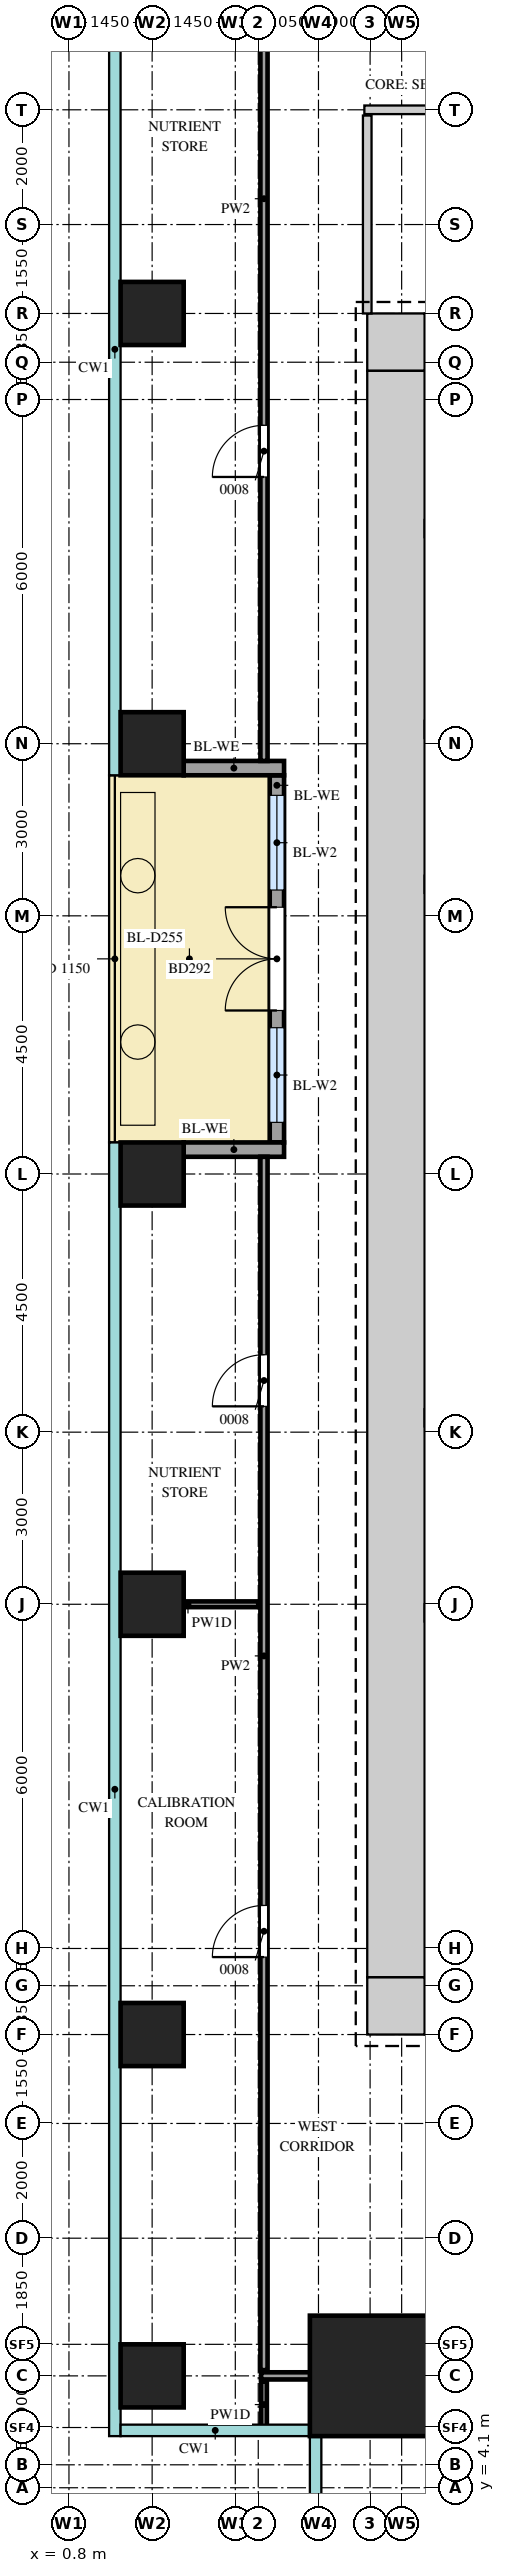
"""IFC4 building model, lengths in metres.
Left out: names, types, materials, properties, quantities, classifications, styles, units other than length and angle.
Written with IfcOpenShell. Run it as: python <this file> out.ifc"""

import sys

from ifc_helpers import new_model, si_unit, direction, frame, frame_2d, origin, origin_2d, place, context, subcontext, project, spatial, rectangle, extrude, source, transform, mapped, element, fill, save


model = new_model("IFC4")
c1 = context("Model", 3, precision=1e-05, world=origin(), true_north=direction((0.0, 1.0)))
c2 = subcontext(c1, "Body", "Model", "MODEL_VIEW")
j1 = project(units=[si_unit("LENGTHUNIT", "METRE"), si_unit("PLANEANGLEUNIT", "RADIAN")], contexts=[c1])
p1 = place(None, origin())
s1 = spatial("IfcSite", under=j1, at=p1, CompositionType="ELEMENT")
p2 = place(p1, origin())
s2 = spatial("IfcBuilding", under=s1, at=p2, CompositionType="ELEMENT")
p3 = place(p2, frame((0.0, 0.0, 136.7)))
s3 = spatial("IfcBuildingStorey", under=s2, at=p3, CompositionType="ELEMENT", Elevation=136.7)
m1 = source(origin(), c2, "Body", "SweptSolid", [
    extrude(rectangle(XDim=1.0, YDim=1.0, at=frame_2d((0.5, 0.0))), origin(), (0.0, 0.0, 1.0), 4.1),
])
for number, where, z_axis, x_axis in (
    (1, (6.0, 41.5, 0.0), (0.0, 0.0, 1.0), (1.0, 0.0, 0.0)),
    (2, (6.0, 12.5, 0.0), (0.0, 0.0, 1.0), (1.0, 0.0, 0.0)),
):
    element("IfcWall", number, at=place(p3, frame(where, z_axis=z_axis, x_axis=x_axis)), inside=s3, PredefinedType="SHEAR", context=c2, shape_type="MappedRepresentation", body=[
        mapped(m1, transform((0.0, 0.0, 0.0))),
    ])
m2 = source(origin(), c2, "Body", "SweptSolid", [
    extrude(rectangle(XDim=28.0, YDim=1.0, at=frame_2d((14.0, 0.0))), origin(), (0.0, 0.0, 1.0), 4.1),
])
p4 = place(p3, frame((6.5, 13.0, 0.0), z_axis=(0.0, 0.0, 1.0), x_axis=(0.0, 1.0, 0.0)))
e3 = element("IfcWall", 3, at=p4, inside=s3, PredefinedType="SHEAR", context=c2, shape_type="MappedRepresentation", body=[
    mapped(m2, transform((0.0, 0.0, 0.0))),
])
m3 = source(origin(), c2, "Body", "SweptSolid", [
    extrude(rectangle(XDim=2.1, YDim=2.1, at=origin_2d()), origin(), (0.0, 0.0, 1.0), 4.4),
])
p5 = place(p3, frame((6.05, 6.05, 0.0), z_axis=(0.0, 0.0, 1.0), x_axis=(1.0, 0.0, 0.0)))
e4 = element("IfcColumn", 4, at=p5, inside=s3, PredefinedType="COLUMN", context=c2, shape_type="MappedRepresentation", body=[
    mapped(m3, transform((0.0, 0.0, 0.0))),
])
m4 = source(origin(), c2, "Body", "SweptSolid", [
    extrude(rectangle(XDim=1.1, YDim=1.1, at=origin_2d()), origin(), (0.0, 0.0, 1.0), 4.1),
])
for number, where, z_axis, x_axis in (
    (5, (2.25, 6.05, 0.0), (0.0, 0.0, 1.0), (1.0, 0.0, 0.0)),
    (6, (2.25, 12.0, 0.0), (0.0, 0.0, 1.0), (1.0, 0.0, 0.0)),
    (7, (2.25, 19.5, 0.0), (0.0, 0.0, 1.0), (1.0, 0.0, 0.0)),
    (8, (2.25, 27.0, 0.0), (0.0, 0.0, 1.0), (1.0, 0.0, 0.0)),
    (9, (2.25, 34.5, 0.0), (0.0, 0.0, 1.0), (1.0, 0.0, 0.0)),
    (10, (2.25, 42.0, 0.0), (0.0, 0.0, 1.0), (1.0, 0.0, 0.0)),
):
    element("IfcColumn", number, at=place(p3, frame(where, z_axis=z_axis, x_axis=x_axis)), inside=s3, PredefinedType="COLUMN", context=c2, shape_type="MappedRepresentation", body=[
        mapped(m4, transform((0.0, 0.0, 0.0))),
    ])
m5 = source(origin(), c2, "Body", "SweptSolid", [
    extrude(rectangle(XDim=6.4, YDim=0.25, at=frame_2d((3.2, 0.0))), origin(), (0.0, 0.0, 1.0), 3.5),
])
p6 = place(p3, frame((4.425, 27.55, 0.0), z_axis=(0.0, 0.0, 1.0), x_axis=(0.0, 1.0, 0.0)))
e11 = element("IfcWall", 11, at=p6, inside=s3, PredefinedType="SOLIDWALL", context=c2, shape_type="MappedRepresentation", body=[
    mapped(m5, transform((0.0, 0.0, 0.0))),
])
m6 = source(origin(), c2, "Body", "SweptSolid", [
    extrude(rectangle(XDim=1.65, YDim=2.4, at=frame_2d((0.825, 1.2))), frame((0.0, 0.135, 0.0), z_axis=(0.0, -1.0, 0.0), x_axis=(1.0, 0.0, 0.0)), (0.0, 0.0, 1.0), 0.27),
])
p7 = place(p6, frame((0.35, 0.0, 0.0)))
e12 = element("IfcOpeningElement", 12, at=p7, cuts=e11, PredefinedType="OPENING", context=c2, shape_type="MappedRepresentation", body=[
    mapped(m6, transform((0.0, 0.0, 0.0))),
])
p8 = place(p6, frame((4.4, 0.0, 0.0)))
e13 = element("IfcOpeningElement", 13, at=p8, cuts=e11, PredefinedType="OPENING", context=c2, shape_type="MappedRepresentation", body=[
    mapped(m6, transform((0.0, 0.0, 0.0))),
])
m7 = source(origin(), c2, "Body", "SweptSolid", [
    extrude(rectangle(XDim=1.8, YDim=2.4, at=frame_2d((0.9, 1.2))), frame((0.0, 0.135, 0.0), z_axis=(0.0, -1.0, 0.0), x_axis=(1.0, 0.0, 0.0)), (0.0, 0.0, 1.0), 0.27),
])
p9 = place(p6, frame((2.3, 0.0, 0.0)))
e14 = element("IfcOpeningElement", 14, at=p9, cuts=e11, PredefinedType="OPENING", context=c2, shape_type="MappedRepresentation", body=[
    mapped(m7, transform((0.0, 0.0, 0.0))),
])
m8 = source(origin(), c2, "Body", "SweptSolid", [
    extrude(rectangle(XDim=1.75, YDim=0.25, at=frame_2d((0.875, 0.0))), origin(), (0.0, 0.0, 1.0), 3.5),
])
for number, where, z_axis, x_axis in (
    (15, (2.8, 27.425, 0.0), (0.0, 0.0, 1.0), (1.0, 0.0, 0.0)),
    (16, (2.8, 34.075, 0.0), (0.0, 0.0, 1.0), (1.0, 0.0, 0.0)),
):
    element("IfcWall", number, at=place(p3, frame(where, z_axis=z_axis, x_axis=x_axis)), inside=s3, PredefinedType="SOLIDWALL", context=c2, shape_type="MappedRepresentation", body=[
        mapped(m8, transform((0.0, 0.0, 0.0))),
    ])
m9 = source(origin(), c2, "Body", "SweptSolid", [
    extrude(rectangle(XDim=0.8, YDim=0.1, at=frame_2d((0.4, 0.0))), origin(), (0.0, 0.0, 1.0), 4.2),
])
p10 = place(p3, frame((4.2, 5.15, 0.0), z_axis=(0.0, 0.0, 1.0), x_axis=(0.0, 1.0, 0.0)))
e17 = element("IfcWall", 17, at=p10, inside=s3, PredefinedType="PARTITIONING", context=c2, shape_type="MappedRepresentation", body=[
    mapped(m9, transform((0.0, 0.0, 0.0))),
])
m10 = source(origin(), c2, "Body", "SweptSolid", [
    extrude(rectangle(XDim=22.3, YDim=0.125, at=frame_2d((11.15, 0.0))), origin(), (0.0, 0.0, 1.0), 3.55),
])
p11 = place(p3, frame((4.15, 6.05, 0.0), z_axis=(0.0, 0.0, 1.0), x_axis=(1.0, 0.0, 0.0)))
e18 = element("IfcWall", 18, at=p11, inside=s3, PredefinedType="PARTITIONING", context=c2, shape_type="MappedRepresentation", body=[
    mapped(m10, transform((0.0, 0.0, 0.0))),
])
m11 = source(origin(), c2, "Body", "SweptSolid", [
    extrude(rectangle(XDim=0.9, YDim=2.1, at=frame_2d((0.45, 1.05))), frame((0.0, 0.073, 0.0), z_axis=(0.0, -1.0, 0.0), x_axis=(1.0, 0.0, 0.0)), (0.0, 0.0, 1.0), 0.145),
])
p12 = place(p11, frame((10.7, 0.0, 0.0)))
e19 = element("IfcOpeningElement", 19, at=p12, cuts=e18, PredefinedType="OPENING", context=c2, shape_type="MappedRepresentation", body=[
    mapped(m11, transform((0.0, 0.0, 0.0))),
])
m12 = source(origin(), c2, "Body", "SweptSolid", [
    extrude(rectangle(XDim=21.15, YDim=0.125, at=frame_2d((10.575, 0.0))), origin(), (0.0, 0.0, 1.0), 4.2),
])
p13 = place(p3, frame((4.2, 6.15, 0.0), z_axis=(0.0, 0.0, 1.0), x_axis=(0.0, 1.0, 0.0)))
e20 = element("IfcWall", 20, at=p13, inside=s3, PredefinedType="PARTITIONING", context=c2, shape_type="MappedRepresentation", body=[
    mapped(m12, transform((0.0, 0.0, 0.0))),
])
p14 = place(p13, frame((7.2, 0.0, 0.0)))
e21 = element("IfcOpeningElement", 21, at=p14, cuts=e20, PredefinedType="OPENING", context=c2, shape_type="MappedRepresentation", body=[
    mapped(m11, transform((0.0, 0.0, 0.0))),
])
p15 = place(p13, frame((16.8, 0.0, 0.0)))
e22 = element("IfcOpeningElement", 22, at=p15, cuts=e20, PredefinedType="OPENING", context=c2, shape_type="MappedRepresentation", body=[
    mapped(m11, transform((0.0, 0.0, 0.0))),
])
m13 = source(origin(), c2, "Body", "SweptSolid", [
    extrude(rectangle(XDim=2.45, YDim=0.1, at=frame_2d((1.225, 0.0))), origin(), (0.0, 0.0, 1.0), 4.2),
])
p16 = place(p3, frame((1.65, 19.5, 0.0), z_axis=(0.0, 0.0, 1.0), x_axis=(1.0, 0.0, 0.0)))
e23 = element("IfcWall", 23, at=p16, inside=s3, PredefinedType="PARTITIONING", context=c2, shape_type="MappedRepresentation", body=[
    mapped(m13, transform((0.0, 0.0, 0.0))),
])
m14 = source(origin(), c2, "Body", "SweptSolid", [
    extrude(rectangle(XDim=13.75, YDim=0.125, at=frame_2d((6.875, 0.0))), origin(), (0.0, 0.0, 1.0), 4.2),
])
p17 = place(p3, frame((4.2, 34.2, 0.0), z_axis=(0.0, 0.0, 1.0), x_axis=(0.0, 1.0, 0.0)))
e24 = element("IfcWall", 24, at=p17, inside=s3, PredefinedType="PARTITIONING", context=c2, shape_type="MappedRepresentation", body=[
    mapped(m14, transform((0.0, 0.0, 0.0))),
])
p18 = place(p17, frame((4.95, 0.0, 0.0)))
e25 = element("IfcOpeningElement", 25, at=p18, cuts=e24, PredefinedType="OPENING", context=c2, shape_type="MappedRepresentation", body=[
    mapped(m11, transform((0.0, 0.0, 0.0))),
])
m15 = source(origin(), c2, "Body", "SweptSolid", [
    extrude(rectangle(XDim=3.45, YDim=0.15, at=frame_2d((1.725, 0.0))), origin(), (0.0, 0.0, 1.0), 4.2),
])
p19 = place(p3, frame((6.0, 42.0, 0.0), z_axis=(0.0, 0.0, 1.0), x_axis=(0.0, 1.0, 0.0)))
e26 = element("IfcWall", 26, at=p19, inside=s3, PredefinedType="PARTITIONING", context=c2, shape_type="MappedRepresentation", body=[
    mapped(m15, transform((0.0, 0.0, 0.0))),
])
m16 = source(origin(), c2, "Body", "SweptSolid", [
    extrude(rectangle(XDim=7.95, YDim=0.15, at=frame_2d((3.975, 0.0))), origin(), (0.0, 0.0, 1.0), 4.2),
])
p20 = place(p3, frame((5.95, 45.55, 0.0), z_axis=(0.0, 0.0, 1.0), x_axis=(1.0, 0.0, 0.0)))
e27 = element("IfcWall", 27, at=p20, inside=s3, PredefinedType="PARTITIONING", context=c2, shape_type="MappedRepresentation", body=[
    mapped(m16, transform((0.0, 0.0, 0.0))),
])
m17 = source(origin(), c2, "Body", "SweptSolid", [
    extrude(rectangle(XDim=0.9, YDim=2.1, at=frame_2d((0.45, 1.05))), frame((0.0, 0.085, 0.0), z_axis=(0.0, -1.0, 0.0), x_axis=(1.0, 0.0, 0.0)), (0.0, 0.0, 1.0), 0.17),
])
p21 = place(p20, frame((3.55, 0.0, 0.0)))
e28 = element("IfcOpeningElement", 28, at=p21, cuts=e27, PredefinedType="OPENING", context=c2, shape_type="MappedRepresentation", body=[
    mapped(m17, transform((0.0, 0.0, 0.0))),
])
m18 = source(origin(), c2, "Body", "SweptSolid", [
    extrude(rectangle(XDim=1.65, YDim=2.4, at=frame_2d((0.825, 1.2))), frame((0.0, 0.03, 0.0), z_axis=(0.0, -1.0, 0.0), x_axis=(1.0, 0.0, 0.0)), (0.0, 0.0, 1.0), 0.06),
])
p22 = place(p7, origin())
e29 = element("IfcWindow", 29, at=p22, inside=s3, PartitioningType="SINGLE_PANEL", PredefinedType="WINDOW", context=c2, shape_type="MappedRepresentation", body=[
    mapped(m18, transform((0.0, 0.0, 0.0))),
])
fill(e12, e29)
p23 = place(p8, origin())
e30 = element("IfcWindow", 30, at=p23, inside=s3, PartitioningType="SINGLE_PANEL", PredefinedType="WINDOW", context=c2, shape_type="MappedRepresentation", body=[
    mapped(m18, transform((0.0, 0.0, 0.0))),
])
fill(e13, e30)
m19 = source(origin(), c2, "Body", "SweptSolid", [
    extrude(rectangle(XDim=1.8, YDim=2.4, at=frame_2d((0.9, 1.2))), frame((0.0, 0.025, 0.0), z_axis=(0.0, -1.0, 0.0), x_axis=(1.0, 0.0, 0.0)), (0.0, 0.0, 1.0), 0.05),
])
p24 = place(p9, origin())
e31 = element("IfcDoor", 31, at=p24, inside=s3, OperationType="DOUBLE_DOOR_DOUBLE_SWING", PredefinedType="DOOR", context=c2, shape_type="MappedRepresentation", body=[
    mapped(m19, transform((0.0, 0.0, 0.0))),
])
fill(e14, e31)
m20 = source(origin(), c2, "Body", "SweptSolid", [
    extrude(rectangle(XDim=0.9, YDim=2.1, at=frame_2d((0.45, 1.05))), frame((0.0, 0.025, 0.0), z_axis=(0.0, -1.0, 0.0), x_axis=(1.0, 0.0, 0.0)), (0.0, 0.0, 1.0), 0.05),
])
p25 = place(p14, origin())
e32 = element("IfcDoor", 32, at=p25, inside=s3, OperationType="SINGLE_SWING_RIGHT", PredefinedType="DOOR", context=c2, shape_type="MappedRepresentation", body=[
    mapped(m20, transform((0.0, 0.0, 0.0))),
])
fill(e21, e32)
p26 = place(p15, origin())
e33 = element("IfcDoor", 33, at=p26, inside=s3, OperationType="SINGLE_SWING_RIGHT", PredefinedType="DOOR", context=c2, shape_type="MappedRepresentation", body=[
    mapped(m20, transform((0.0, 0.0, 0.0))),
])
fill(e22, e33)
p27 = place(p18, origin())
e34 = element("IfcDoor", 34, at=p27, inside=s3, OperationType="SINGLE_SWING_RIGHT", PredefinedType="DOOR", context=c2, shape_type="MappedRepresentation", body=[
    mapped(m20, transform((0.0, 0.0, 0.0))),
])
fill(e25, e34)
save(model, sys.argv[1])
